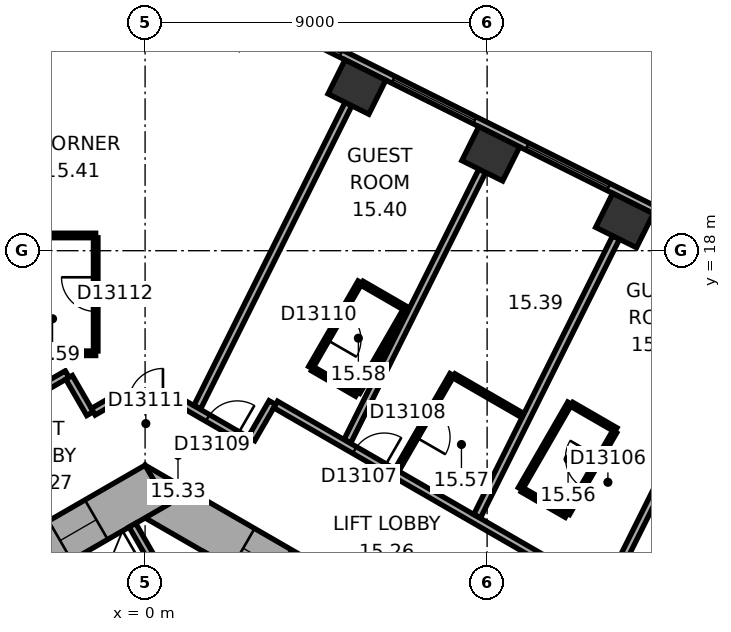
"""IFC4 building model, lengths in metres.
Left out: names, types, materials, properties, quantities, classifications, styles, units other than length and angle.
Written with IfcOpenShell. Run it as: python <this file> out.ifc"""

import sys

from ifc_helpers import new_model, si_unit, direction, frame, frame_2d, origin, origin_2d, place, context, subcontext, project, spatial, rectangle, extrude, element, fill, save


model = new_model("IFC4")
c1 = context("Model", 3, precision=1e-05, world=origin(), true_north=direction((0.0, 1.0)))
c2 = subcontext(c1, "Body", "Model", "MODEL_VIEW")
j1 = project(units=[si_unit("LENGTHUNIT", "METRE"), si_unit("PLANEANGLEUNIT", "RADIAN")], contexts=[c1])
p1 = place(None, origin())
s1 = spatial("IfcSite", under=j1, at=p1, CompositionType="ELEMENT")
p2 = place(p1, origin())
s2 = spatial("IfcBuilding", under=s1, at=p2, CompositionType="ELEMENT")
p3 = place(p2, frame((0.0, 0.0, 70.4)))
s3 = spatial("IfcBuildingStorey", under=s2, at=p3, CompositionType="ELEMENT", Elevation=70.4)
for number, where, z_axis, x_axis in (
    (1, (12.616, 18.795, 0.0), (0.0, 0.0, 1.0), (-0.895, 0.446, 0.0)),
    (2, (9.095, 20.551, 0.0), (0.0, 0.0, 1.0), (-0.895, 0.446, 0.0)),
    (3, (5.574, 22.306, 0.0), (0.0, 0.0, 1.0), (-0.895, 0.446, 0.0)),
):
    element("IfcColumn", number, at=place(p3, frame(where, z_axis=z_axis, x_axis=x_axis)), inside=s3, PredefinedType="COLUMN", context=c2, shape_type="SweptSolid", body=[
        extrude(rectangle(XDim=1.2, YDim=1.0, at=origin_2d()), origin(), (0.0, 0.0, 1.0), 3.3),
    ])
p4 = place(p3, frame((10.4, 5.658, 0.0), z_axis=(0.0, 0.0, 1.0), x_axis=(-0.866021384402, 0.500006961711, 0.0)))
e4 = element("IfcWall", 4, at=p4, inside=s3, PredefinedType="SHEAR", context=c2, shape_type="SweptSolid", body=[
    extrude(rectangle(XDim=12.355, YDim=1.2, at=frame_2d((6.178, 0.0))), origin(), (0.0, 0.0, 1.0), 3.3),
])
p5 = place(p4, frame((2.728, 0.0, 0.0)))
e5 = element("IfcOpeningElement", 5, at=p5, cuts=e4, PredefinedType="OPENING", context=c2, shape_type="SweptSolid", body=[
    extrude(rectangle(XDim=1.1, YDim=2.1, at=frame_2d((0.55, 1.05))), frame((0.0, 0.61, 0.0), z_axis=(0.0, -1.0, 0.0), x_axis=(1.0, 0.0, 0.0)), (0.0, 0.0, 1.0), 1.22),
])
p6 = place(p4, frame((5.328, 0.0, 0.0)))
e6 = element("IfcOpeningElement", 6, at=p6, cuts=e4, PredefinedType="OPENING", context=c2, shape_type="SweptSolid", body=[
    extrude(rectangle(XDim=1.1, YDim=2.1, at=frame_2d((0.55, 1.05))), frame((0.0, 0.61, 0.0), z_axis=(0.0, -1.0, 0.0), x_axis=(1.0, 0.0, 0.0)), (0.0, 0.0, 1.0), 1.22),
])
p7 = place(p4, frame((7.928, 0.0, 0.0)))
e7 = element("IfcOpeningElement", 7, at=p7, cuts=e4, PredefinedType="OPENING", context=c2, shape_type="SweptSolid", body=[
    extrude(rectangle(XDim=1.1, YDim=2.1, at=frame_2d((0.55, 1.05))), frame((0.0, 0.61, 0.0), z_axis=(0.0, -1.0, 0.0), x_axis=(1.0, 0.0, 0.0)), (0.0, 0.0, 1.0), 1.22),
])
p8 = place(p3, frame((0.3, 11.836, 0.0), z_axis=(0.0, 0.0, 1.0), x_axis=(-0.866021384402, -0.500006961711, 0.0)))
e8 = element("IfcWall", 8, at=p8, inside=s3, PredefinedType="SHEAR", context=c2, shape_type="SweptSolid", body=[
    extrude(rectangle(XDim=12.355, YDim=1.2, at=frame_2d((6.178, 0.0))), origin(), (0.0, 0.0, 1.0), 3.3),
])
p9 = place(p8, frame((6.378, 0.0, 0.0)))
e9 = element("IfcOpeningElement", 9, at=p9, cuts=e8, PredefinedType="OPENING", context=c2, shape_type="SweptSolid", body=[
    extrude(rectangle(XDim=1.5, YDim=2.1, at=frame_2d((0.75, 1.05))), frame((0.0, 0.61, 0.0), z_axis=(0.0, -1.0, 0.0), x_axis=(1.0, 0.0, 0.0)), (0.0, 0.0, 1.0), 1.22),
])
p10 = place(p8, frame((1.828, 0.0, 0.0)))
e10 = element("IfcOpeningElement", 10, at=p10, cuts=e8, PredefinedType="OPENING", context=c2, shape_type="SweptSolid", body=[
    extrude(rectangle(XDim=1.1, YDim=2.1, at=frame_2d((0.55, 1.05))), frame((0.0, 0.61, 0.0), z_axis=(0.0, -1.0, 0.0), x_axis=(1.0, 0.0, 0.0)), (0.0, 0.0, 1.0), 1.22),
])
p11 = place(p3, frame((20.63, 15.47, 0.0), z_axis=(0.0, 0.0, 1.0), x_axis=(-0.894934518609, 0.446197498203, 0.0)))
e11 = element("IfcWall", 11, at=p11, inside=s3, PredefinedType="STANDARD", context=c2, shape_type="SweptSolid", body=[
    extrude(rectangle(XDim=21.246, YDim=0.2, at=frame_2d((10.623, 0.0))), origin(), (0.0, 0.0, 1.0), 3.3),
])
p12 = place(p11, frame((1.553, 0.0, 0.8)))
e12 = element("IfcOpeningElement", 12, at=p12, cuts=e11, PredefinedType="OPENING", context=c2, shape_type="SweptSolid", body=[
    extrude(rectangle(XDim=2.4, YDim=1.7, at=frame_2d((1.2, 0.85))), frame((0.0, 0.11, 0.0), z_axis=(0.0, -1.0, 0.0), x_axis=(1.0, 0.0, 0.0)), (0.0, 0.0, 1.0), 0.22),
])
p13 = place(p11, frame((5.488, 0.0, 0.8)))
e13 = element("IfcOpeningElement", 13, at=p13, cuts=e11, PredefinedType="OPENING", context=c2, shape_type="SweptSolid", body=[
    extrude(rectangle(XDim=2.4, YDim=1.7, at=frame_2d((1.2, 0.85))), frame((0.0, 0.11, 0.0), z_axis=(0.0, -1.0, 0.0), x_axis=(1.0, 0.0, 0.0)), (0.0, 0.0, 1.0), 0.22),
])
p14 = place(p11, frame((9.422, 0.0, 0.8)))
e14 = element("IfcOpeningElement", 14, at=p14, cuts=e11, PredefinedType="OPENING", context=c2, shape_type="SweptSolid", body=[
    extrude(rectangle(XDim=2.4, YDim=1.7, at=frame_2d((1.2, 0.85))), frame((0.0, 0.11, 0.0), z_axis=(0.0, -1.0, 0.0), x_axis=(1.0, 0.0, 0.0)), (0.0, 0.0, 1.0), 0.22),
])
p15 = place(p11, frame((13.357, 0.0, 0.8)))
e15 = element("IfcOpeningElement", 15, at=p15, cuts=e11, PredefinedType="OPENING", context=c2, shape_type="SweptSolid", body=[
    extrude(rectangle(XDim=2.4, YDim=1.7, at=frame_2d((1.2, 0.85))), frame((0.0, 0.11, 0.0), z_axis=(0.0, -1.0, 0.0), x_axis=(1.0, 0.0, 0.0)), (0.0, 0.0, 1.0), 0.22),
])
p16 = place(p11, frame((17.292, 0.0, 0.8)))
e16 = element("IfcOpeningElement", 16, at=p16, cuts=e11, PredefinedType="OPENING", context=c2, shape_type="SweptSolid", body=[
    extrude(rectangle(XDim=2.4, YDim=1.7, at=frame_2d((1.2, 0.85))), frame((0.0, 0.11, 0.0), z_axis=(0.0, -1.0, 0.0), x_axis=(1.0, 0.0, 0.0)), (0.0, 0.0, 1.0), 0.22),
])
p17 = place(p3, frame((0.532, 8.122, 0.0), z_axis=(0.0, 0.0, 1.0), x_axis=(0.500077893725, 0.86598042715, 0.0)))
e17 = element("IfcWall", 17, at=p17, inside=s3, PredefinedType="PARTITIONING", context=c2, shape_type="SweptSolid", body=[
    extrude(rectangle(XDim=2.2, YDim=0.2, at=frame_2d((1.1, 0.0))), origin(), (0.0, 0.0, 1.0), 3.05),
])
p18 = place(p3, frame((0.767, 8.872, 0.0), z_axis=(0.0, 0.0, 1.0), x_axis=(-0.499994660107, 0.866028486751, 0.0)))
e18 = element("IfcWall", 18, at=p18, inside=s3, PredefinedType="PARTITIONING", context=c2, shape_type="SweptSolid", body=[
    extrude(rectangle(XDim=2.2, YDim=0.2, at=frame_2d((1.1, 0.0))), origin(), (0.0, 0.0, 1.0), 3.05),
])
p19 = place(p3, frame((-3.94, 18.401, 0.0), z_axis=(0.0, 0.0, 1.0), x_axis=(1.0, 0.0, 0.0)))
e19 = element("IfcWall", 19, at=p19, inside=s3, PredefinedType="PARTITIONING", context=c2, shape_type="SweptSolid", body=[
    extrude(rectangle(XDim=2.64, YDim=0.12, at=frame_2d((1.32, 0.0))), origin(), (0.0, 0.0, 1.0), 3.05),
])
p20 = place(p3, frame((-2.05, 14.752, 0.0), z_axis=(0.0, 0.0, 1.0), x_axis=(-0.866030936828, -0.499990416364, 0.0)))
e20 = element("IfcWall", 20, at=p20, inside=s3, PredefinedType="PARTITIONING", context=c2, shape_type="SweptSolid", body=[
    extrude(rectangle(XDim=3.102, YDim=0.2, at=frame_2d((1.551, 0.0))), origin(), (0.0, 0.0, 1.0), 3.05),
])
p21 = place(p3, frame((-1.449, 13.712, 0.0), z_axis=(0.0, 0.0, 1.0), x_axis=(-0.499978356969, 0.866037899034, 0.0)))
e21 = element("IfcWall", 21, at=p21, inside=s3, PredefinedType="PARTITIONING", context=c2, shape_type="SweptSolid", body=[
    extrude(rectangle(XDim=1.101, YDim=0.2, at=frame_2d((0.551, 0.0))), origin(), (0.0, 0.0, 1.0), 3.05),
])
p22 = place(p3, frame((-1.3, 15.301, 0.0), z_axis=(0.0, 0.0, 1.0), x_axis=(-1.0, 0.0, 0.0)))
e22 = element("IfcWall", 22, at=p22, inside=s3, PredefinedType="PARTITIONING", context=c2, shape_type="SweptSolid", body=[
    extrude(rectangle(XDim=1.661, YDim=0.12, at=frame_2d((0.831, 0.0))), origin(), (0.0, 0.0, 1.0), 3.05),
])
p23 = place(p3, frame((-1.3, 18.341, 0.0), z_axis=(0.0, 0.0, 1.0), x_axis=(0.0, -1.0, 0.0)))
e23 = element("IfcWall", 23, at=p23, inside=s3, PredefinedType="PARTITIONING", context=c2, shape_type="SweptSolid", body=[
    extrude(rectangle(XDim=2.98, YDim=0.12, at=frame_2d((1.49, 0.0))), origin(), (0.0, 0.0, 1.0), 3.05),
])
p24 = place(p23, frame((1.04, 0.0, 0.0)))
e24 = element("IfcOpeningElement", 24, at=p24, cuts=e23, PredefinedType="OPENING", context=c2, shape_type="SweptSolid", body=[
    extrude(rectangle(XDim=0.9, YDim=2.1, at=frame_2d((0.45, 1.05))), frame((0.0, 0.07, 0.0), z_axis=(0.0, -1.0, 0.0), x_axis=(1.0, 0.0, 0.0)), (0.0, 0.0, 1.0), 0.14),
])
p25 = place(p3, frame((-0.95, 14.001, 0.0), z_axis=(0.0, 0.0, 1.0), x_axis=(-0.86609177584, -0.499885022602, 0.0)))
e25 = element("IfcWall", 25, at=p25, inside=s3, PredefinedType="PARTITIONING", context=c2, shape_type="SweptSolid", body=[
    extrude(rectangle(XDim=0.477, YDim=0.2, at=frame_2d((0.238, 0.0))), origin(), (0.0, 0.0, 1.0), 3.05),
])
p26 = place(p3, frame((0.95, 14.001, 0.0), z_axis=(0.0, 0.0, 1.0), x_axis=(-1.0, 0.0, 0.0)))
e26 = element("IfcWall", 26, at=p26, inside=s3, PredefinedType="PARTITIONING", context=c2, shape_type="SweptSolid", body=[
    extrude(rectangle(XDim=1.86, YDim=0.2, at=frame_2d((0.93, 0.0))), origin(), (0.0, 0.0, 1.0), 3.05),
])
p27 = place(p26, frame((0.48, 0.0, 0.0)))
e27 = element("IfcOpeningElement", 27, at=p27, cuts=e26, PredefinedType="OPENING", context=c2, shape_type="SweptSolid", body=[
    extrude(rectangle(XDim=0.9, YDim=2.1, at=frame_2d((0.45, 1.05))), frame((0.0, 0.11, 0.0), z_axis=(0.0, -1.0, 0.0), x_axis=(1.0, 0.0, 0.0)), (0.0, 0.0, 1.0), 0.22),
])
p28 = place(p3, frame((2.748, 12.962, 0.0), z_axis=(0.0, 0.0, 1.0), x_axis=(-0.866013897511, 0.50001992892, 0.0)))
e28 = element("IfcWall", 28, at=p28, inside=s3, PredefinedType="PARTITIONING", context=c2, shape_type="SweptSolid", body=[
    extrude(rectangle(XDim=2.037, YDim=0.2, at=frame_2d((1.018, 0.0))), origin(), (0.0, 0.0, 1.0), 3.05),
])
p29 = place(p28, frame((0.372, 0.0, 0.0)))
e29 = element("IfcOpeningElement", 29, at=p29, cuts=e28, PredefinedType="OPENING", context=c2, shape_type="SweptSolid", body=[
    extrude(rectangle(XDim=0.9, YDim=2.1, at=frame_2d((0.45, 1.05))), frame((0.0, 0.11, 0.0), z_axis=(0.0, -1.0, 0.0), x_axis=(1.0, 0.0, 0.0)), (0.0, 0.0, 1.0), 0.22),
])
p30 = place(p3, frame((3.349, 14.002, 0.0), z_axis=(0.0, 0.0, 1.0), x_axis=(-0.500074377092, -0.865982457891, 0.0)))
e30 = element("IfcWall", 30, at=p30, inside=s3, PredefinedType="PARTITIONING", context=c2, shape_type="SweptSolid", body=[
    extrude(rectangle(XDim=1.101, YDim=0.2, at=frame_2d((0.55, 0.0))), origin(), (0.0, 0.0, 1.0), 3.05),
])
p31 = place(p3, frame((4.356, 14.922, 0.0), z_axis=(0.0, 0.0, 1.0), x_axis=(0.499936506574, 0.866062058628, 0.0)))
e31 = element("IfcWall", 31, at=p31, inside=s3, PredefinedType="PARTITIONING", context=c2, shape_type="SweptSolid", body=[
    extrude(rectangle(XDim=2.6, YDim=0.12, at=frame_2d((1.3, 0.0))), origin(), (0.0, 0.0, 1.0), 3.05),
])
p32 = place(p31, frame((0.85, 0.0, 0.0)))
e32 = element("IfcOpeningElement", 32, at=p32, cuts=e31, PredefinedType="OPENING", context=c2, shape_type="SweptSolid", body=[
    extrude(rectangle(XDim=0.9, YDim=2.1, at=frame_2d((0.45, 1.05))), frame((0.0, 0.07, 0.0), z_axis=(0.0, -1.0, 0.0), x_axis=(1.0, 0.0, 0.0)), (0.0, 0.0, 1.0), 0.14),
])
p33 = place(p3, frame((5.351, 21.859, 0.0), z_axis=(0.0, 0.0, 1.0), x_axis=(-0.446205309328, -0.894930624086, 0.0)))
e33 = element("IfcWall", 33, at=p33, inside=s3, PredefinedType="PARTITIONING", context=c2, shape_type="SweptSolid", body=[
    extrude(rectangle(XDim=8.913, YDim=0.2, at=frame_2d((4.457, 0.0))), origin(), (0.0, 0.0, 1.0), 2.6),
])
p34 = place(p3, frame((5.569, 14.222, 0.0), z_axis=(0.0, 0.0, 1.0), x_axis=(-0.866036909293, 0.499980071345, 0.0)))
e34 = element("IfcWall", 34, at=p34, inside=s3, PredefinedType="PARTITIONING", context=c2, shape_type="SweptSolid", body=[
    extrude(rectangle(XDim=1.34, YDim=0.12, at=frame_2d((0.67, 0.0))), origin(), (0.0, 0.0, 1.0), 3.05),
])
p35 = place(p3, frame((5.708, 17.144, 0.0), z_axis=(0.0, 0.0, 1.0), x_axis=(0.866082447003, -0.499901185229, 0.0)))
e35 = element("IfcWall", 35, at=p35, inside=s3, PredefinedType="PARTITIONING", context=c2, shape_type="SweptSolid", body=[
    extrude(rectangle(XDim=1.34, YDim=0.12, at=frame_2d((0.67, 0.0))), origin(), (0.0, 0.0, 1.0), 3.05),
])
p36 = place(p3, frame((6.625, 12.227, 0.0), z_axis=(0.0, 0.0, 1.0), x_axis=(0.500023687443, 0.866011727401, 0.0)))
e36 = element("IfcWall", 36, at=p36, inside=s3, PredefinedType="PARTITIONING", context=c2, shape_type="SweptSolid", body=[
    extrude(rectangle(XDim=2.9, YDim=0.12, at=frame_2d((1.45, 0.0))), origin(), (0.0, 0.0, 1.0), 3.05),
])
p37 = place(p36, frame((1.0, 0.0, 0.0)))
e37 = element("IfcOpeningElement", 37, at=p37, cuts=e36, PredefinedType="OPENING", context=c2, shape_type="SweptSolid", body=[
    extrude(rectangle(XDim=0.9, YDim=2.1, at=frame_2d((0.45, 1.05))), frame((0.0, 0.07, 0.0), z_axis=(0.0, -1.0, 0.0), x_axis=(1.0, 0.0, 0.0)), (0.0, 0.0, 1.0), 0.14),
])
p38 = place(p3, frame((6.839, 16.422, 0.0), z_axis=(0.0, 0.0, 1.0), x_axis=(-0.50000366821, -0.866023285932, 0.0)))
e38 = element("IfcWall", 38, at=p38, inside=s3, PredefinedType="PARTITIONING", context=c2, shape_type="SweptSolid", body=[
    extrude(rectangle(XDim=2.48, YDim=0.12, at=frame_2d((1.24, 0.0))), origin(), (0.0, 0.0, 1.0), 3.05),
])
p39 = place(p3, frame((8.127, 14.708, 0.0), z_axis=(0.0, 0.0, 1.0), x_axis=(0.866065472234, -0.499930592986, 0.0)))
e39 = element("IfcWall", 39, at=p39, inside=s3, PredefinedType="PARTITIONING", context=c2, shape_type="SweptSolid", body=[
    extrude(rectangle(XDim=2.098, YDim=0.12, at=frame_2d((1.049, 0.0))), origin(), (0.0, 0.0, 1.0), 3.05),
])
p40 = place(p3, frame((8.872, 20.104, 0.0), z_axis=(0.0, 0.0, 1.0), x_axis=(-0.446218378653, -0.894924107706, 0.0)))
e40 = element("IfcWall", 40, at=p40, inside=s3, PredefinedType="PARTITIONING", context=c2, shape_type="SweptSolid", body=[
    extrude(rectangle(XDim=7.95, YDim=0.2, at=frame_2d((3.975, 0.0))), origin(), (0.0, 0.0, 1.0), 3.05),
])
p41 = place(p3, frame((9.875, 11.736, 0.0), z_axis=(0.0, 0.0, 1.0), x_axis=(0.499936506574, 0.866062058628, 0.0)))
e41 = element("IfcWall", 41, at=p41, inside=s3, PredefinedType="PARTITIONING", context=c2, shape_type="SweptSolid", body=[
    extrude(rectangle(XDim=2.6, YDim=0.12, at=frame_2d((1.3, 0.0))), origin(), (0.0, 0.0, 1.0), 3.05),
])
p42 = place(p3, frame((10.885, 9.652, 0.0), z_axis=(0.0, 0.0, 1.0), x_axis=(-0.866033868542, 0.499985338323, 0.0)))
e42 = element("IfcWall", 42, at=p42, inside=s3, PredefinedType="PARTITIONING", context=c2, shape_type="SweptSolid", body=[
    extrude(rectangle(XDim=8.602, YDim=0.2, at=frame_2d((4.301, 0.0))), origin(), (0.0, 0.0, 1.0), 3.05),
])
p43 = place(p42, frame((5.302, 0.0, 0.0)))
e43 = element("IfcOpeningElement", 43, at=p43, cuts=e42, PredefinedType="OPENING", context=c2, shape_type="SweptSolid", body=[
    extrude(rectangle(XDim=0.9, YDim=2.1, at=frame_2d((0.45, 1.05))), frame((0.0, 0.11, 0.0), z_axis=(0.0, -1.0, 0.0), x_axis=(1.0, 0.0, 0.0)), (0.0, 0.0, 1.0), 0.22),
])
for number, where, z_axis, x_axis in (
    (44, (11.087, 11.036, 0.0), (0.0, 0.0, 1.0), (-0.866, 0.5, 0.0)),
    (45, (11.226, 13.958, 0.0), (0.0, 0.0, 1.0), (0.866, -0.5, 0.0)),
):
    element("IfcWall", number, at=place(p3, frame(where, z_axis=z_axis, x_axis=x_axis)), inside=s3, PredefinedType="PARTITIONING", context=c2, shape_type="SweptSolid", body=[
        extrude(rectangle(XDim=1.34, YDim=0.12, at=frame_2d((0.67, 0.0))), origin(), (0.0, 0.0, 1.0), 3.05),
    ])
p44 = place(p3, frame((12.357, 13.236, 0.0), z_axis=(0.0, 0.0, 1.0), x_axis=(-0.50000366821, -0.866023285932, 0.0)))
e46 = element("IfcWall", 46, at=p44, inside=s3, PredefinedType="PARTITIONING", context=c2, shape_type="SweptSolid", body=[
    extrude(rectangle(XDim=2.48, YDim=0.12, at=frame_2d((1.24, 0.0))), origin(), (0.0, 0.0, 1.0), 3.05),
])
p45 = place(p44, frame((0.79, 0.0, 0.0)))
e47 = element("IfcOpeningElement", 47, at=p45, cuts=e46, PredefinedType="OPENING", context=c2, shape_type="SweptSolid", body=[
    extrude(rectangle(XDim=0.9, YDim=2.1, at=frame_2d((0.45, 1.05))), frame((0.0, 0.07, 0.0), z_axis=(0.0, -1.0, 0.0), x_axis=(1.0, 0.0, 0.0)), (0.0, 0.0, 1.0), 0.14),
])
p46 = place(p3, frame((12.393, 18.348, 0.0), z_axis=(0.0, 0.0, 1.0), x_axis=(-0.446176022699, -0.894945225569, 0.0)))
e48 = element("IfcWall", 48, at=p46, inside=s3, PredefinedType="PARTITIONING", context=c2, shape_type="SweptSolid", body=[
    extrude(rectangle(XDim=8.191, YDim=0.2, at=frame_2d((4.095, 0.0))), origin(), (0.0, 0.0, 1.0), 2.6),
])
p47 = place(p3, frame((15.915, 16.592, 0.0), z_axis=(0.0, 0.0, 1.0), x_axis=(-0.446199736347, -0.894933402709, 0.0)))
e49 = element("IfcWall", 49, at=p47, inside=s3, PredefinedType="PARTITIONING", context=c2, shape_type="SweptSolid", body=[
    extrude(rectangle(XDim=9.635, YDim=0.2, at=frame_2d((4.817, 0.0))), origin(), (0.0, 0.0, 1.0), 3.05),
])
p48 = place(p14, origin())
e50 = element("IfcWindow", 50, at=p48, inside=s3, PartitioningType="SINGLE_PANEL", PredefinedType="WINDOW", context=c2, shape_type="SweptSolid", body=[
    extrude(rectangle(XDim=2.4, YDim=1.7, at=frame_2d((1.2, 0.85))), frame((0.0, 0.03, 0.0), z_axis=(0.0, -1.0, 0.0), x_axis=(1.0, 0.0, 0.0)), (0.0, 0.0, 1.0), 0.06),
])
fill(e14, e50)
p49 = place(p15, origin())
e51 = element("IfcWindow", 51, at=p49, inside=s3, PartitioningType="SINGLE_PANEL", PredefinedType="WINDOW", context=c2, shape_type="SweptSolid", body=[
    extrude(rectangle(XDim=2.4, YDim=1.7, at=frame_2d((1.2, 0.85))), frame((0.0, 0.03, 0.0), z_axis=(0.0, -1.0, 0.0), x_axis=(1.0, 0.0, 0.0)), (0.0, 0.0, 1.0), 0.06),
])
fill(e15, e51)
p50 = place(p16, origin())
e52 = element("IfcWindow", 52, at=p50, inside=s3, PartitioningType="SINGLE_PANEL", PredefinedType="WINDOW", context=c2, shape_type="SweptSolid", body=[
    extrude(rectangle(XDim=2.4, YDim=1.7, at=frame_2d((1.2, 0.85))), frame((0.0, 0.03, 0.0), z_axis=(0.0, -1.0, 0.0), x_axis=(1.0, 0.0, 0.0)), (0.0, 0.0, 1.0), 0.06),
])
fill(e16, e52)
p51 = place(p7, origin())
e53 = element("IfcDoor", 53, at=p51, inside=s3, OperationType="DOUBLE_DOOR_SLIDING", PredefinedType="DOOR", context=c2, shape_type="SweptSolid", body=[
    extrude(rectangle(XDim=1.1, YDim=2.1, at=frame_2d((0.55, 1.05))), frame((0.0, 0.025, 0.0), z_axis=(0.0, -1.0, 0.0), x_axis=(1.0, 0.0, 0.0)), (0.0, 0.0, 1.0), 0.05),
])
fill(e7, e53)
p52 = place(p10, origin())
e54 = element("IfcDoor", 54, at=p52, inside=s3, OperationType="DOUBLE_DOOR_SLIDING", PredefinedType="DOOR", context=c2, shape_type="SweptSolid", body=[
    extrude(rectangle(XDim=1.1, YDim=2.1, at=frame_2d((0.55, 1.05))), frame((0.0, 0.025, 0.0), z_axis=(0.0, -1.0, 0.0), x_axis=(1.0, 0.0, 0.0)), (0.0, 0.0, 1.0), 0.05),
])
fill(e10, e54)
p53 = place(p45, origin())
e55 = element("IfcDoor", 55, at=p53, inside=s3, OperationType="SINGLE_SWING_LEFT", PredefinedType="DOOR", context=c2, shape_type="SweptSolid", body=[
    extrude(rectangle(XDim=0.9, YDim=2.1, at=frame_2d((0.45, 1.05))), frame((0.0, 0.025, 0.0), z_axis=(0.0, -1.0, 0.0), x_axis=(1.0, 0.0, 0.0)), (0.0, 0.0, 1.0), 0.05),
])
fill(e47, e55)
p54 = place(p43, origin())
e56 = element("IfcDoor", 56, at=p54, inside=s3, OperationType="SINGLE_SWING_LEFT", PredefinedType="DOOR", context=c2, shape_type="SweptSolid", body=[
    extrude(rectangle(XDim=0.9, YDim=2.1, at=frame_2d((0.45, 1.05))), frame((0.0, 0.025, 0.0), z_axis=(0.0, -1.0, 0.0), x_axis=(1.0, 0.0, 0.0)), (0.0, 0.0, 1.0), 0.05),
])
fill(e43, e56)
p55 = place(p37, origin())
e57 = element("IfcDoor", 57, at=p55, inside=s3, OperationType="SINGLE_SWING_LEFT", PredefinedType="DOOR", context=c2, shape_type="SweptSolid", body=[
    extrude(rectangle(XDim=0.9, YDim=2.1, at=frame_2d((0.45, 1.05))), frame((0.0, 0.025, 0.0), z_axis=(0.0, -1.0, 0.0), x_axis=(1.0, 0.0, 0.0)), (0.0, 0.0, 1.0), 0.05),
])
fill(e37, e57)
p56 = place(p29, origin())
e58 = element("IfcDoor", 58, at=p56, inside=s3, OperationType="SINGLE_SWING_LEFT", PredefinedType="DOOR", context=c2, shape_type="SweptSolid", body=[
    extrude(rectangle(XDim=0.9, YDim=2.1, at=frame_2d((0.45, 1.05))), frame((0.0, 0.025, 0.0), z_axis=(0.0, -1.0, 0.0), x_axis=(1.0, 0.0, 0.0)), (0.0, 0.0, 1.0), 0.05),
])
fill(e29, e58)
p57 = place(p32, origin())
e59 = element("IfcDoor", 59, at=p57, inside=s3, OperationType="SINGLE_SWING_LEFT", PredefinedType="DOOR", context=c2, shape_type="SweptSolid", body=[
    extrude(rectangle(XDim=0.9, YDim=2.1, at=frame_2d((0.45, 1.05))), frame((0.0, 0.025, 0.0), z_axis=(0.0, -1.0, 0.0), x_axis=(1.0, 0.0, 0.0)), (0.0, 0.0, 1.0), 0.05),
])
fill(e32, e59)
p58 = place(p27, origin())
e60 = element("IfcDoor", 60, at=p58, inside=s3, OperationType="SINGLE_SWING_LEFT", PredefinedType="DOOR", context=c2, shape_type="SweptSolid", body=[
    extrude(rectangle(XDim=0.9, YDim=2.1, at=frame_2d((0.45, 1.05))), frame((0.0, 0.025, 0.0), z_axis=(0.0, -1.0, 0.0), x_axis=(1.0, 0.0, 0.0)), (0.0, 0.0, 1.0), 0.05),
])
fill(e27, e60)
p59 = place(p24, origin())
e61 = element("IfcDoor", 61, at=p59, inside=s3, OperationType="SINGLE_SWING_LEFT", PredefinedType="DOOR", context=c2, shape_type="SweptSolid", body=[
    extrude(rectangle(XDim=0.9, YDim=2.1, at=frame_2d((0.45, 1.05))), frame((0.0, 0.025, 0.0), z_axis=(0.0, -1.0, 0.0), x_axis=(1.0, 0.0, 0.0)), (0.0, 0.0, 1.0), 0.05),
])
fill(e24, e61)
save(model, sys.argv[1])
